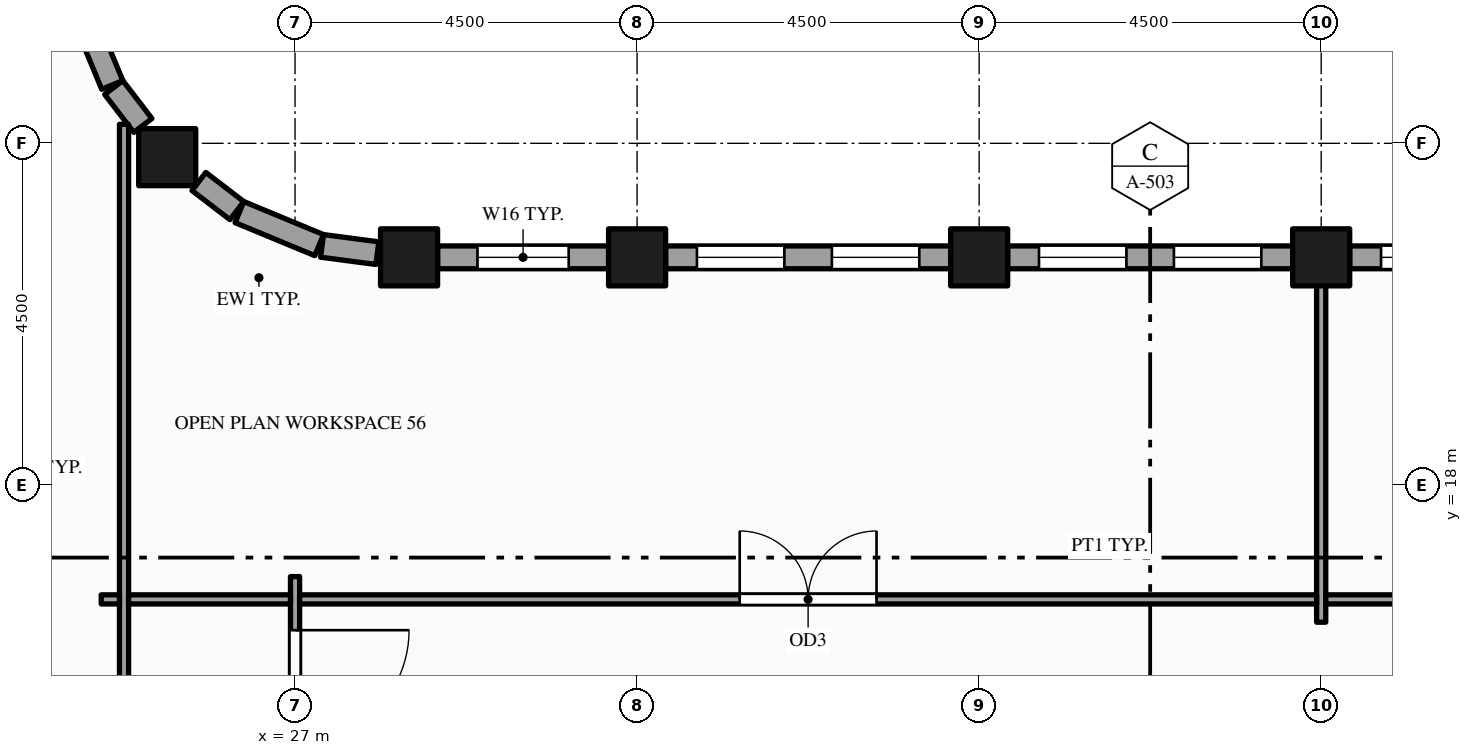
"""IFC4 building model, lengths in metres.
Left out: names, types, materials, properties, quantities, classifications, styles, units other than length and angle.
Written with IfcOpenShell. Run it as: python <this file> out.ifc"""

import sys

from ifc_helpers import new_model, si_unit, direction, frame, frame_2d, origin, origin_2d, place, context, subcontext, project, spatial, rectangle, hollow_rectangle, extrude, element, fill, save


model = new_model("IFC4")
c1 = context("Model", 3, precision=1e-05, world=origin(), true_north=direction((0.0, 1.0)))
c2 = subcontext(c1, "Body", "Model", "MODEL_VIEW")
j1 = project(units=[si_unit("LENGTHUNIT", "METRE"), si_unit("PLANEANGLEUNIT", "RADIAN")], contexts=[c1])
p1 = place(None, origin())
s1 = spatial("IfcSite", under=j1, at=p1, CompositionType="ELEMENT")
p2 = place(p1, origin())
s2 = spatial("IfcBuilding", under=s1, at=p2, CompositionType="ELEMENT")
p3 = place(p2, frame((0.0, 0.0, 223.0)))
s3 = spatial("IfcBuildingStorey", under=s2, at=p3, CompositionType="ELEMENT", Elevation=223.0)
for number, where, z_axis, x_axis in (
    (1, (25.318, 22.318, -0.15), (0.0, 0.0, 1.0), (1.0, 0.0, 0.0)),
    (2, (28.5, 21.0, -0.15), (0.0, 0.0, 1.0), (1.0, 0.0, 0.0)),
    (3, (31.5, 21.0, -0.15), (0.0, 0.0, 1.0), (1.0, 0.0, 0.0)),
    (4, (36.0, 21.0, -0.15), (0.0, 0.0, 1.0), (1.0, 0.0, 0.0)),
    (5, (40.5, 21.0, -0.15), (0.0, 0.0, 1.0), (1.0, 0.0, 0.0)),
):
    element("IfcColumn", number, at=place(p3, frame(where, z_axis=z_axis, x_axis=x_axis)), inside=s3, PredefinedType="COLUMN", context=c2, shape_type="SweptSolid", body=[
        extrude(hollow_rectangle(XDim=0.75, YDim=0.75, WallThickness=0.036, at=origin_2d()), origin(), (0.0, 0.0, 1.0), 4.0),
    ])
p4 = place(p3, frame((44.625, 21.0, 0.0), z_axis=(0.0, 0.0, 1.0), x_axis=(-1.0, 0.0, 0.0)))
e6 = element("IfcWall", 6, at=p4, inside=s3, PredefinedType="STANDARD", context=c2, shape_type="SweptSolid", body=[
    extrude(rectangle(XDim=3.75, YDim=0.3, at=frame_2d((1.875, 0.0))), origin(), (0.0, 0.0, 1.0), 2.87),
])
p5 = place(p4, frame((0.413, 0.0, 0.9)))
e7 = element("IfcOpeningElement", 7, at=p5, cuts=e6, PredefinedType="OPENING", context=c2, shape_type="SweptSolid", body=[
    extrude(rectangle(XDim=1.15, YDim=1.75, at=frame_2d((0.575, 0.875))), frame((0.0, 0.16, 0.0), z_axis=(0.0, -1.0, 0.0), x_axis=(1.0, 0.0, 0.0)), (0.0, 0.0, 1.0), 0.32),
])
p6 = place(p4, frame((2.188, 0.0, 0.9)))
e8 = element("IfcOpeningElement", 8, at=p6, cuts=e6, PredefinedType="OPENING", context=c2, shape_type="SweptSolid", body=[
    extrude(rectangle(XDim=1.15, YDim=1.75, at=frame_2d((0.575, 0.875))), frame((0.0, 0.16, 0.0), z_axis=(0.0, -1.0, 0.0), x_axis=(1.0, 0.0, 0.0)), (0.0, 0.0, 1.0), 0.32),
])
p7 = place(p3, frame((40.125, 21.0, 0.0), z_axis=(0.0, 0.0, 1.0), x_axis=(-1.0, 0.0, 0.0)))
e9 = element("IfcWall", 9, at=p7, inside=s3, PredefinedType="STANDARD", context=c2, shape_type="SweptSolid", body=[
    extrude(rectangle(XDim=3.75, YDim=0.3, at=frame_2d((1.875, 0.0))), origin(), (0.0, 0.0, 1.0), 2.87),
])
p8 = place(p7, frame((0.413, 0.0, 0.9)))
e10 = element("IfcOpeningElement", 10, at=p8, cuts=e9, PredefinedType="OPENING", context=c2, shape_type="SweptSolid", body=[
    extrude(rectangle(XDim=1.15, YDim=1.75, at=frame_2d((0.575, 0.875))), frame((0.0, 0.16, 0.0), z_axis=(0.0, -1.0, 0.0), x_axis=(1.0, 0.0, 0.0)), (0.0, 0.0, 1.0), 0.32),
])
p9 = place(p7, frame((2.188, 0.0, 0.9)))
e11 = element("IfcOpeningElement", 11, at=p9, cuts=e9, PredefinedType="OPENING", context=c2, shape_type="SweptSolid", body=[
    extrude(rectangle(XDim=1.15, YDim=1.75, at=frame_2d((0.575, 0.875))), frame((0.0, 0.16, 0.0), z_axis=(0.0, -1.0, 0.0), x_axis=(1.0, 0.0, 0.0)), (0.0, 0.0, 1.0), 0.32),
])
p10 = place(p3, frame((35.625, 21.0, 0.0), z_axis=(0.0, 0.0, 1.0), x_axis=(-1.0, 0.0, 0.0)))
e12 = element("IfcWall", 12, at=p10, inside=s3, PredefinedType="STANDARD", context=c2, shape_type="SweptSolid", body=[
    extrude(rectangle(XDim=3.75, YDim=0.3, at=frame_2d((1.875, 0.0))), origin(), (0.0, 0.0, 1.0), 2.87),
])
p11 = place(p10, frame((0.413, 0.0, 0.9)))
e13 = element("IfcOpeningElement", 13, at=p11, cuts=e12, PredefinedType="OPENING", context=c2, shape_type="SweptSolid", body=[
    extrude(rectangle(XDim=1.15, YDim=1.75, at=frame_2d((0.575, 0.875))), frame((0.0, 0.16, 0.0), z_axis=(0.0, -1.0, 0.0), x_axis=(1.0, 0.0, 0.0)), (0.0, 0.0, 1.0), 0.32),
])
p12 = place(p10, frame((2.188, 0.0, 0.9)))
e14 = element("IfcOpeningElement", 14, at=p12, cuts=e12, PredefinedType="OPENING", context=c2, shape_type="SweptSolid", body=[
    extrude(rectangle(XDim=1.15, YDim=1.75, at=frame_2d((0.575, 0.875))), frame((0.0, 0.16, 0.0), z_axis=(0.0, -1.0, 0.0), x_axis=(1.0, 0.0, 0.0)), (0.0, 0.0, 1.0), 0.32),
])
p13 = place(p3, frame((31.125, 21.0, 0.0), z_axis=(0.0, 0.0, 1.0), x_axis=(-1.0, 0.0, 0.0)))
e15 = element("IfcWall", 15, at=p13, inside=s3, PredefinedType="STANDARD", context=c2, shape_type="SweptSolid", body=[
    extrude(rectangle(XDim=2.25, YDim=0.3, at=frame_2d((1.125, 0.0))), origin(), (0.0, 0.0, 1.0), 2.87),
])
p14 = place(p13, frame((0.525, 0.0, 0.9)))
e16 = element("IfcOpeningElement", 16, at=p14, cuts=e15, PredefinedType="OPENING", context=c2, shape_type="SweptSolid", body=[
    extrude(rectangle(XDim=1.2, YDim=1.75, at=frame_2d((0.6, 0.875))), frame((0.0, 0.16, 0.0), z_axis=(0.0, -1.0, 0.0), x_axis=(1.0, 0.0, 0.0)), (0.0, 0.0, 1.0), 0.32),
])
p15 = place(p3, frame((28.083, 21.055, 0.0), z_axis=(0.0, 0.0, 1.0), x_axis=(-0.99142711513, 0.130660917588, 0.0)))
e17 = element("IfcWall", 17, at=p15, inside=s3, PredefinedType="STANDARD", context=c2, shape_type="SweptSolid", body=[
    extrude(rectangle(XDim=0.734, YDim=0.3, at=frame_2d((0.367, 0.0))), origin(), (0.0, 0.0, 1.0), 3.157),
])
p16 = place(p3, frame((27.317, 21.161, 0.0), z_axis=(0.0, 0.0, 1.0), x_axis=(-0.923914616768, 0.382598720491, 0.0)))
e18 = element("IfcWall", 18, at=p16, inside=s3, PredefinedType="STANDARD", context=c2, shape_type="SweptSolid", body=[
    extrude(rectangle(XDim=1.135, YDim=0.3, at=frame_2d((0.568, 0.0))), origin(), (0.0, 0.0, 1.0), 2.87),
])
p17 = place(p3, frame((26.234, 21.615, 0.0), z_axis=(0.0, 0.0, 1.0), x_axis=(-0.793575131083, 0.608472276547, 0.0)))
e19 = element("IfcWall", 19, at=p17, inside=s3, PredefinedType="STANDARD", context=c2, shape_type="SweptSolid", body=[
    extrude(rectangle(XDim=0.629, YDim=0.3, at=frame_2d((0.314, 0.0))), origin(), (0.0, 0.0, 1.0), 3.157),
])
p18 = place(p3, frame((24.998, 22.735, 0.0), z_axis=(0.0, 0.0, 1.0), x_axis=(-0.608472276547, 0.793575131083, 0.0)))
e20 = element("IfcWall", 20, at=p18, inside=s3, PredefinedType="STANDARD", context=c2, shape_type="SweptSolid", body=[
    extrude(rectangle(XDim=0.629, YDim=0.3, at=frame_2d((0.314, 0.0))), origin(), (0.0, 0.0, 1.0), 2.76),
])
p19 = place(p3, frame((24.595, 23.268, 0.0), z_axis=(0.0, 0.0, 1.0), x_axis=(-0.382598720491, 0.923914616768, 0.0)))
e21 = element("IfcWall", 21, at=p19, inside=s3, PredefinedType="STANDARD", context=c2, shape_type="SweptSolid", body=[
    extrude(rectangle(XDim=1.135, YDim=0.3, at=frame_2d((0.568, 0.0))), origin(), (0.0, 0.0, 1.0), 2.76),
])
p20 = place(p3, frame((24.75, -1.35, 0.0), z_axis=(0.0, 0.0, 1.0), x_axis=(0.0, 1.0, 0.0)))
e22 = element("IfcWall", 22, at=p20, inside=s3, PredefinedType="PARTITIONING", context=c2, shape_type="SweptSolid", body=[
    extrude(rectangle(XDim=24.101, YDim=0.12, at=frame_2d((12.05, 0.0))), origin(), (0.0, 0.0, 1.0), 2.76),
])
p21 = place(p20, frame((8.475, 0.0, 0.0)))
e23 = element("IfcOpeningElement", 23, at=p21, cuts=e22, PredefinedType="OPENING", context=c2, shape_type="SweptSolid", body=[
    extrude(rectangle(XDim=1.5, YDim=2.1, at=frame_2d((0.75, 1.05))), frame((0.0, 0.07, 0.0), z_axis=(0.0, -1.0, 0.0), x_axis=(1.0, 0.0, 0.0)), (0.0, 0.0, 1.0), 0.14),
])
p22 = place(p20, frame((13.5, 0.0, 0.0)))
e24 = element("IfcOpeningElement", 24, at=p22, cuts=e22, PredefinedType="OPENING", context=c2, shape_type="SweptSolid", body=[
    extrude(rectangle(XDim=1.2, YDim=2.1, at=frame_2d((0.6, 1.05))), frame((0.0, 0.07, 0.0), z_axis=(0.0, -1.0, 0.0), x_axis=(1.0, 0.0, 0.0)), (0.0, 0.0, 1.0), 0.14),
])
p23 = place(p3, frame((27.0, 2.7, 0.0), z_axis=(0.0, 0.0, 1.0), x_axis=(0.0, 1.0, 0.0)))
e25 = element("IfcWall", 25, at=p23, inside=s3, PredefinedType="PARTITIONING", context=c2, shape_type="SweptSolid", body=[
    extrude(rectangle(XDim=14.1, YDim=0.12, at=frame_2d((7.05, 0.0))), origin(), (0.0, 0.0, 1.0), 2.87),
])
p24 = place(p23, frame((0.705, 0.0, 0.0)))
e26 = element("IfcOpeningElement", 26, at=p24, cuts=e25, PredefinedType="OPENING", context=c2, shape_type="SweptSolid", body=[
    extrude(rectangle(XDim=1.5, YDim=2.1, at=frame_2d((0.75, 1.05))), frame((0.0, 0.07, 0.0), z_axis=(0.0, -1.0, 0.0), x_axis=(1.0, 0.0, 0.0)), (0.0, 0.0, 1.0), 0.14),
])
p25 = place(p23, frame((11.895, 0.0, 0.0)))
e27 = element("IfcOpeningElement", 27, at=p25, cuts=e25, PredefinedType="OPENING", context=c2, shape_type="SweptSolid", body=[
    extrude(rectangle(XDim=1.5, YDim=2.1, at=frame_2d((0.75, 1.05))), frame((0.0, 0.07, 0.0), z_axis=(0.0, -1.0, 0.0), x_axis=(1.0, 0.0, 0.0)), (0.0, 0.0, 1.0), 0.14),
])
p26 = place(p3, frame((40.5, 16.2, 0.0), z_axis=(0.0, 0.0, 1.0), x_axis=(0.0, 1.0, 0.0)))
e28 = element("IfcWall", 28, at=p26, inside=s3, PredefinedType="PARTITIONING", context=c2, shape_type="SweptSolid", body=[
    extrude(rectangle(XDim=4.65, YDim=0.12, at=frame_2d((2.325, 0.0))), origin(), (0.0, 0.0, 1.0), 2.87),
])
p27 = place(p3, frame((24.45, 16.5, 0.0), z_axis=(0.0, 0.0, 1.0), x_axis=(1.0, 0.0, 0.0)))
e29 = element("IfcWall", 29, at=p27, inside=s3, PredefinedType="PARTITIONING", context=c2, shape_type="SweptSolid", body=[
    extrude(rectangle(XDim=0.24, YDim=0.12, at=frame_2d((0.12, 0.0))), origin(), (0.0, 0.0, 1.0), 2.76),
])
p28 = place(p3, frame((24.81, 16.5, 0.0), z_axis=(0.0, 0.0, 1.0), x_axis=(1.0, 0.0, 0.0)))
e30 = element("IfcWall", 30, at=p28, inside=s3, PredefinedType="PARTITIONING", context=c2, shape_type="SweptSolid", body=[
    extrude(rectangle(XDim=2.13, YDim=0.12, at=frame_2d((1.065, 0.0))), origin(), (0.0, 0.0, 1.0), 2.76),
])
p29 = place(p3, frame((27.06, 16.5, 0.0), z_axis=(0.0, 0.0, 1.0), x_axis=(1.0, 0.0, 0.0)))
e31 = element("IfcWall", 31, at=p29, inside=s3, PredefinedType="PARTITIONING", context=c2, shape_type="SweptSolid", body=[
    extrude(rectangle(XDim=13.38, YDim=0.12, at=frame_2d((6.69, 0.0))), origin(), (0.0, 0.0, 1.0), 2.87),
])
p30 = place(p29, frame((5.79, 0.0, 0.0)))
e32 = element("IfcOpeningElement", 32, at=p30, cuts=e31, PredefinedType="OPENING", context=c2, shape_type="SweptSolid", body=[
    extrude(rectangle(XDim=1.8, YDim=2.1, at=frame_2d((0.9, 1.05))), frame((0.0, 0.07, 0.0), z_axis=(0.0, -1.0, 0.0), x_axis=(1.0, 0.0, 0.0)), (0.0, 0.0, 1.0), 0.14),
])
p31 = place(p3, frame((40.56, 16.5, 0.0), z_axis=(0.0, 0.0, 1.0), x_axis=(1.0, 0.0, 0.0)))
e33 = element("IfcWall", 33, at=p31, inside=s3, PredefinedType="PARTITIONING", context=c2, shape_type="SweptSolid", body=[
    extrude(rectangle(XDim=4.38, YDim=0.12, at=frame_2d((2.19, 0.0))), origin(), (0.0, 0.0, 1.0), 2.87),
])
p32 = place(p31, frame((1.69, 0.0, 0.0)))
e34 = element("IfcOpeningElement", 34, at=p32, cuts=e33, PredefinedType="OPENING", context=c2, shape_type="SweptSolid", body=[
    extrude(rectangle(XDim=1.0, YDim=2.1, at=frame_2d((0.5, 1.05))), frame((0.0, 0.07, 0.0), z_axis=(0.0, -1.0, 0.0), x_axis=(1.0, 0.0, 0.0)), (0.0, 0.0, 1.0), 0.14),
])
p33 = place(p6, origin())
e35 = element("IfcWindow", 35, at=p33, inside=s3, PartitioningType="SINGLE_PANEL", PredefinedType="WINDOW", context=c2, shape_type="SweptSolid", body=[
    extrude(rectangle(XDim=1.15, YDim=1.75, at=frame_2d((0.575, 0.875))), frame((0.0, 0.03, 0.0), z_axis=(0.0, -1.0, 0.0), x_axis=(1.0, 0.0, 0.0)), (0.0, 0.0, 1.0), 0.06),
])
fill(e8, e35)
p34 = place(p8, origin())
e36 = element("IfcWindow", 36, at=p34, inside=s3, PartitioningType="SINGLE_PANEL", PredefinedType="WINDOW", context=c2, shape_type="SweptSolid", body=[
    extrude(rectangle(XDim=1.15, YDim=1.75, at=frame_2d((0.575, 0.875))), frame((0.0, 0.03, 0.0), z_axis=(0.0, -1.0, 0.0), x_axis=(1.0, 0.0, 0.0)), (0.0, 0.0, 1.0), 0.06),
])
fill(e10, e36)
p35 = place(p9, origin())
e37 = element("IfcWindow", 37, at=p35, inside=s3, PartitioningType="SINGLE_PANEL", PredefinedType="WINDOW", context=c2, shape_type="SweptSolid", body=[
    extrude(rectangle(XDim=1.15, YDim=1.75, at=frame_2d((0.575, 0.875))), frame((0.0, 0.03, 0.0), z_axis=(0.0, -1.0, 0.0), x_axis=(1.0, 0.0, 0.0)), (0.0, 0.0, 1.0), 0.06),
])
fill(e11, e37)
p36 = place(p11, origin())
e38 = element("IfcWindow", 38, at=p36, inside=s3, PartitioningType="SINGLE_PANEL", PredefinedType="WINDOW", context=c2, shape_type="SweptSolid", body=[
    extrude(rectangle(XDim=1.15, YDim=1.75, at=frame_2d((0.575, 0.875))), frame((0.0, 0.03, 0.0), z_axis=(0.0, -1.0, 0.0), x_axis=(1.0, 0.0, 0.0)), (0.0, 0.0, 1.0), 0.06),
])
fill(e13, e38)
p37 = place(p12, origin())
e39 = element("IfcWindow", 39, at=p37, inside=s3, PartitioningType="SINGLE_PANEL", PredefinedType="WINDOW", context=c2, shape_type="SweptSolid", body=[
    extrude(rectangle(XDim=1.15, YDim=1.75, at=frame_2d((0.575, 0.875))), frame((0.0, 0.03, 0.0), z_axis=(0.0, -1.0, 0.0), x_axis=(1.0, 0.0, 0.0)), (0.0, 0.0, 1.0), 0.06),
])
fill(e14, e39)
p38 = place(p14, origin())
e40 = element("IfcWindow", 40, at=p38, inside=s3, PartitioningType="SINGLE_PANEL", PredefinedType="WINDOW", context=c2, shape_type="SweptSolid", body=[
    extrude(rectangle(XDim=1.2, YDim=1.75, at=frame_2d((0.6, 0.875))), frame((0.0, 0.03, 0.0), z_axis=(0.0, -1.0, 0.0), x_axis=(1.0, 0.0, 0.0)), (0.0, 0.0, 1.0), 0.06),
])
fill(e16, e40)
p39 = place(p25, origin())
e41 = element("IfcDoor", 41, at=p39, inside=s3, OperationType="SINGLE_SWING_RIGHT", PredefinedType="DOOR", context=c2, shape_type="SweptSolid", body=[
    extrude(rectangle(XDim=1.5, YDim=2.1, at=frame_2d((0.75, 1.05))), frame((0.0, 0.025, 0.0), z_axis=(0.0, -1.0, 0.0), x_axis=(1.0, 0.0, 0.0)), (0.0, 0.0, 1.0), 0.05),
])
fill(e27, e41)
p40 = place(p30, origin())
e42 = element("IfcDoor", 42, at=p40, inside=s3, OperationType="DOUBLE_DOOR_SINGLE_SWING", PredefinedType="DOOR", context=c2, shape_type="SweptSolid", body=[
    extrude(rectangle(XDim=1.8, YDim=2.1, at=frame_2d((0.9, 1.05))), frame((0.0, 0.025, 0.0), z_axis=(0.0, -1.0, 0.0), x_axis=(1.0, 0.0, 0.0)), (0.0, 0.0, 1.0), 0.05),
])
fill(e32, e42)
save(model, sys.argv[1])
